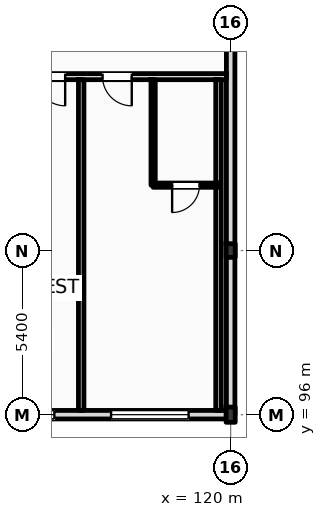
"""IFC4 building model, lengths in metres.
Left out: names, types, materials, properties, quantities, classifications, styles, units other than length and angle.
Written with IfcOpenShell. Run it as: python <this file> out.ifc"""

import sys

from ifc_helpers import new_model, si_unit, direction, frame, frame_2d, origin, origin_2d, place, context, subcontext, project, spatial, rectangle, i_section, extrude, element, fill, save


model = new_model("IFC4")
c1 = context("Model", 3, precision=1e-05, world=origin(), true_north=direction((0.0, 1.0)))
c2 = subcontext(c1, "Body", "Model", "MODEL_VIEW")
j1 = project(units=[si_unit("LENGTHUNIT", "METRE"), si_unit("PLANEANGLEUNIT", "RADIAN")], contexts=[c1])
p1 = place(None, origin())
s1 = spatial("IfcSite", under=j1, at=p1, CompositionType="ELEMENT")
p2 = place(p1, origin())
s2 = spatial("IfcBuilding", under=s1, at=p2, CompositionType="ELEMENT")
p3 = place(p2, frame((0.0, 0.0, 31.8)))
s3 = spatial("IfcBuildingStorey", under=s2, at=p3, CompositionType="ELEMENT", Elevation=31.8)
p4 = place(p3, frame((120.0, 96.0, 0.0), z_axis=(0.0, 0.0, 1.0), x_axis=(1.0, 0.0, 0.0)))
e1 = element("IfcColumn", 1, at=p4, inside=s3, PredefinedType="COLUMN", context=c2, shape_type="SweptSolid", body=[
    extrude(i_section(OverallWidth=0.3, OverallDepth=0.5, WebThickness=0.014, FlangeThickness=0.028, FilletRadius=0.027, at=origin_2d()), origin(), (0.0, 0.0, 1.0), 3.6),
])
p5 = place(p3, frame((120.0, 101.4, 0.0), z_axis=(0.0, 0.0, 1.0), x_axis=(1.0, 0.0, 0.0)))
e2 = element("IfcColumn", 2, at=p5, inside=s3, PredefinedType="COLUMN", context=c2, shape_type="SweptSolid", body=[
    extrude(i_section(OverallWidth=0.3, OverallDepth=0.45, WebThickness=0.014, FlangeThickness=0.026, FilletRadius=0.027, at=origin_2d()), origin(), (0.0, 0.0, 1.0), 3.6),
])
p6 = place(p3, frame((120.0, 96.0, 0.0), z_axis=(0.0, 0.0, 1.0), x_axis=(0.0, 1.0, 0.0)))
e3 = element("IfcWall", 3, at=p6, inside=s3, PredefinedType="STANDARD", context=c2, shape_type="SweptSolid", body=[
    extrude(rectangle(XDim=22.0, YDim=0.28, at=frame_2d((11.0, 0.0))), origin(), (0.0, 0.0, 1.0), 2.91),
])
p7 = place(p3, frame((25.2, 96.0, 0.0), z_axis=(0.0, 0.0, 1.0), x_axis=(1.0, 0.0, 0.0)))
e4 = element("IfcWall", 4, at=p7, inside=s3, PredefinedType="STANDARD", context=c2, shape_type="SweptSolid", body=[
    extrude(rectangle(XDim=94.8, YDim=0.28, at=frame_2d((47.4, 0.0))), origin(), (0.0, 0.0, 1.0), 2.72),
])
p8 = place(p7, frame((16.394, 0.0, 0.9)))
e5 = element("IfcOpeningElement", 5, at=p8, cuts=e4, PredefinedType="OPENING", context=c2, shape_type="SweptSolid", body=[
    extrude(rectangle(XDim=2.0, YDim=1.64, at=frame_2d((1.0, 0.82))), frame((0.0, 0.15, 0.0), z_axis=(0.0, -1.0, 0.0), x_axis=(1.0, 0.0, 0.0)), (0.0, 0.0, 1.0), 0.3),
])
p9 = place(p7, frame((20.207, 0.0, 0.9)))
e6 = element("IfcOpeningElement", 6, at=p9, cuts=e4, PredefinedType="OPENING", context=c2, shape_type="SweptSolid", body=[
    extrude(rectangle(XDim=2.3, YDim=1.64, at=frame_2d((1.15, 0.82))), frame((0.0, 0.15, 0.0), z_axis=(0.0, -1.0, 0.0), x_axis=(1.0, 0.0, 0.0)), (0.0, 0.0, 1.0), 0.3),
])
p10 = place(p7, frame((24.287, 0.0, 0.9)))
e7 = element("IfcOpeningElement", 7, at=p10, cuts=e4, PredefinedType="OPENING", context=c2, shape_type="SweptSolid", body=[
    extrude(rectangle(XDim=2.358, YDim=1.64, at=frame_2d((1.179, 0.82))), frame((0.0, 0.15, 0.0), z_axis=(0.0, -1.0, 0.0), x_axis=(1.0, 0.0, 0.0)), (0.0, 0.0, 1.0), 0.3),
])
p11 = place(p7, frame((27.665, 0.0, 0.9)))
e8 = element("IfcOpeningElement", 8, at=p11, cuts=e4, PredefinedType="OPENING", context=c2, shape_type="SweptSolid", body=[
    extrude(rectangle(XDim=1.8, YDim=1.64, at=frame_2d((0.9, 0.82))), frame((0.0, 0.15, 0.0), z_axis=(0.0, -1.0, 0.0), x_axis=(1.0, 0.0, 0.0)), (0.0, 0.0, 1.0), 0.3),
])
p12 = place(p7, frame((32.103, 0.0, 0.9)))
e9 = element("IfcOpeningElement", 9, at=p12, cuts=e4, PredefinedType="OPENING", context=c2, shape_type="SweptSolid", body=[
    extrude(rectangle(XDim=2.359, YDim=1.64, at=frame_2d((1.179, 0.82))), frame((0.0, 0.15, 0.0), z_axis=(0.0, -1.0, 0.0), x_axis=(1.0, 0.0, 0.0)), (0.0, 0.0, 1.0), 0.3),
])
p13 = place(p7, frame((36.336, 0.0, 0.9)))
e10 = element("IfcOpeningElement", 10, at=p13, cuts=e4, PredefinedType="OPENING", context=c2, shape_type="SweptSolid", body=[
    extrude(rectangle(XDim=1.2, YDim=1.64, at=frame_2d((0.6, 0.82))), frame((0.0, 0.15, 0.0), z_axis=(0.0, -1.0, 0.0), x_axis=(1.0, 0.0, 0.0)), (0.0, 0.0, 1.0), 0.3),
])
p14 = place(p7, frame((56.177, 0.0, 0.9)))
e11 = element("IfcOpeningElement", 11, at=p14, cuts=e4, PredefinedType="OPENING", context=c2, shape_type="SweptSolid", body=[
    extrude(rectangle(XDim=1.35, YDim=1.64, at=frame_2d((0.675, 0.82))), frame((0.0, 0.15, 0.0), z_axis=(0.0, -1.0, 0.0), x_axis=(1.0, 0.0, 0.0)), (0.0, 0.0, 1.0), 0.3),
])
p15 = place(p7, frame((60.086, 0.0, 0.9)))
e12 = element("IfcOpeningElement", 12, at=p15, cuts=e4, PredefinedType="OPENING", context=c2, shape_type="SweptSolid", body=[
    extrude(rectangle(XDim=1.5, YDim=1.64, at=frame_2d((0.75, 0.82))), frame((0.0, 0.15, 0.0), z_axis=(0.0, -1.0, 0.0), x_axis=(1.0, 0.0, 0.0)), (0.0, 0.0, 1.0), 0.3),
])
p16 = place(p7, frame((64.838, 0.0, 0.9)))
e13 = element("IfcOpeningElement", 13, at=p16, cuts=e4, PredefinedType="OPENING", context=c2, shape_type="SweptSolid", body=[
    extrude(rectangle(XDim=1.65, YDim=1.64, at=frame_2d((0.825, 0.82))), frame((0.0, 0.15, 0.0), z_axis=(0.0, -1.0, 0.0), x_axis=(1.0, 0.0, 0.0)), (0.0, 0.0, 1.0), 0.3),
])
p17 = place(p7, frame((68.419, 0.0, 0.9)))
e14 = element("IfcOpeningElement", 14, at=p17, cuts=e4, PredefinedType="OPENING", context=c2, shape_type="SweptSolid", body=[
    extrude(rectangle(XDim=0.9, YDim=1.64, at=frame_2d((0.45, 0.82))), frame((0.0, 0.15, 0.0), z_axis=(0.0, -1.0, 0.0), x_axis=(1.0, 0.0, 0.0)), (0.0, 0.0, 1.0), 0.3),
])
p18 = place(p7, frame((73.544, 0.0, 0.9)))
e15 = element("IfcOpeningElement", 15, at=p18, cuts=e4, PredefinedType="OPENING", context=c2, shape_type="SweptSolid", body=[
    extrude(rectangle(XDim=1.95, YDim=1.64, at=frame_2d((0.975, 0.82))), frame((0.0, 0.15, 0.0), z_axis=(0.0, -1.0, 0.0), x_axis=(1.0, 0.0, 0.0)), (0.0, 0.0, 1.0), 0.3),
])
p19 = place(p7, frame((78.897, 0.0, 0.9)))
e16 = element("IfcOpeningElement", 16, at=p19, cuts=e4, PredefinedType="OPENING", context=c2, shape_type="SweptSolid", body=[
    extrude(rectangle(XDim=1.35, YDim=1.64, at=frame_2d((0.675, 0.82))), frame((0.0, 0.15, 0.0), z_axis=(0.0, -1.0, 0.0), x_axis=(1.0, 0.0, 0.0)), (0.0, 0.0, 1.0), 0.3),
])
p20 = place(p7, frame((82.249, 0.0, 0.9)))
e17 = element("IfcOpeningElement", 17, at=p20, cuts=e4, PredefinedType="OPENING", context=c2, shape_type="SweptSolid", body=[
    extrude(rectangle(XDim=2.25, YDim=1.64, at=frame_2d((1.125, 0.82))), frame((0.0, 0.15, 0.0), z_axis=(0.0, -1.0, 0.0), x_axis=(1.0, 0.0, 0.0)), (0.0, 0.0, 1.0), 0.3),
])
p21 = place(p7, frame((87.202, 0.0, 0.9)))
e18 = element("IfcOpeningElement", 18, at=p21, cuts=e4, PredefinedType="OPENING", context=c2, shape_type="SweptSolid", body=[
    extrude(rectangle(XDim=1.8, YDim=1.64, at=frame_2d((0.9, 0.82))), frame((0.0, 0.15, 0.0), z_axis=(0.0, -1.0, 0.0), x_axis=(1.0, 0.0, 0.0)), (0.0, 0.0, 1.0), 0.3),
])
p22 = place(p7, frame((90.867, 0.0, 0.9)))
e19 = element("IfcOpeningElement", 19, at=p22, cuts=e4, PredefinedType="OPENING", context=c2, shape_type="SweptSolid", body=[
    extrude(rectangle(XDim=2.55, YDim=1.64, at=frame_2d((1.275, 0.82))), frame((0.0, 0.15, 0.0), z_axis=(0.0, -1.0, 0.0), x_axis=(1.0, 0.0, 0.0)), (0.0, 0.0, 1.0), 0.3),
])
p23 = place(p3, frame((79.76, 107.12, 0.0), z_axis=(0.0, 0.0, 1.0), x_axis=(1.0, 0.0, 0.0)))
e20 = element("IfcWall", 20, at=p23, inside=s3, PredefinedType="PARTITIONING", context=c2, shape_type="SweptSolid", body=[
    extrude(rectangle(XDim=40.1, YDim=0.2, at=frame_2d((20.05, 0.0))), origin(), (0.0, 0.0, 1.0), 3.36),
])
p24 = place(p23, frame((2.887, 0.0, 0.0)))
e21 = element("IfcOpeningElement", 21, at=p24, cuts=e20, PredefinedType="OPENING", context=c2, shape_type="SweptSolid", body=[
    extrude(rectangle(XDim=0.96, YDim=2.2, at=frame_2d((0.48, 1.1))), frame((0.0, 0.11, 0.0), z_axis=(0.0, -1.0, 0.0), x_axis=(1.0, 0.0, 0.0)), (0.0, 0.0, 1.0), 0.22),
])
p25 = place(p23, frame((5.121, 0.0, 0.0)))
e22 = element("IfcOpeningElement", 22, at=p25, cuts=e20, PredefinedType="OPENING", context=c2, shape_type="SweptSolid", body=[
    extrude(rectangle(XDim=0.96, YDim=2.2, at=frame_2d((0.48, 1.1))), frame((0.0, 0.11, 0.0), z_axis=(0.0, -1.0, 0.0), x_axis=(1.0, 0.0, 0.0)), (0.0, 0.0, 1.0), 0.22),
])
p26 = place(p23, frame((11.698, 0.0, 0.0)))
e23 = element("IfcOpeningElement", 23, at=p26, cuts=e20, PredefinedType="OPENING", context=c2, shape_type="SweptSolid", body=[
    extrude(rectangle(XDim=0.96, YDim=2.2, at=frame_2d((0.48, 1.1))), frame((0.0, 0.11, 0.0), z_axis=(0.0, -1.0, 0.0), x_axis=(1.0, 0.0, 0.0)), (0.0, 0.0, 1.0), 0.22),
])
p27 = place(p23, frame((13.976, 0.0, 0.0)))
e24 = element("IfcOpeningElement", 24, at=p27, cuts=e20, PredefinedType="OPENING", context=c2, shape_type="SweptSolid", body=[
    extrude(rectangle(XDim=0.96, YDim=2.2, at=frame_2d((0.48, 1.1))), frame((0.0, 0.11, 0.0), z_axis=(0.0, -1.0, 0.0), x_axis=(1.0, 0.0, 0.0)), (0.0, 0.0, 1.0), 0.22),
])
p28 = place(p23, frame((20.554, 0.0, 0.0)))
e25 = element("IfcOpeningElement", 25, at=p28, cuts=e20, PredefinedType="OPENING", context=c2, shape_type="SweptSolid", body=[
    extrude(rectangle(XDim=0.96, YDim=2.2, at=frame_2d((0.48, 1.1))), frame((0.0, 0.11, 0.0), z_axis=(0.0, -1.0, 0.0), x_axis=(1.0, 0.0, 0.0)), (0.0, 0.0, 1.0), 0.22),
])
p29 = place(p23, frame((24.982, 0.0, 0.0)))
e26 = element("IfcOpeningElement", 26, at=p29, cuts=e20, PredefinedType="OPENING", context=c2, shape_type="SweptSolid", body=[
    extrude(rectangle(XDim=0.96, YDim=2.2, at=frame_2d((0.48, 1.1))), frame((0.0, 0.11, 0.0), z_axis=(0.0, -1.0, 0.0), x_axis=(1.0, 0.0, 0.0)), (0.0, 0.0, 1.0), 0.22),
])
p30 = place(p23, frame((29.409, 0.0, 0.0)))
e27 = element("IfcOpeningElement", 27, at=p30, cuts=e20, PredefinedType="OPENING", context=c2, shape_type="SweptSolid", body=[
    extrude(rectangle(XDim=0.96, YDim=2.2, at=frame_2d((0.48, 1.1))), frame((0.0, 0.11, 0.0), z_axis=(0.0, -1.0, 0.0), x_axis=(1.0, 0.0, 0.0)), (0.0, 0.0, 1.0), 0.22),
])
p31 = place(p23, frame((33.837, 0.0, 0.0)))
e28 = element("IfcOpeningElement", 28, at=p31, cuts=e20, PredefinedType="OPENING", context=c2, shape_type="SweptSolid", body=[
    extrude(rectangle(XDim=0.96, YDim=2.2, at=frame_2d((0.48, 1.1))), frame((0.0, 0.11, 0.0), z_axis=(0.0, -1.0, 0.0), x_axis=(1.0, 0.0, 0.0)), (0.0, 0.0, 1.0), 0.22),
])
p32 = place(p23, frame((36.027, 0.0, 0.0)))
e29 = element("IfcOpeningElement", 29, at=p32, cuts=e20, PredefinedType="OPENING", context=c2, shape_type="SweptSolid", body=[
    extrude(rectangle(XDim=0.96, YDim=2.2, at=frame_2d((0.48, 1.1))), frame((0.0, 0.11, 0.0), z_axis=(0.0, -1.0, 0.0), x_axis=(1.0, 0.0, 0.0)), (0.0, 0.0, 1.0), 0.22),
])
for number, where, z_axis, x_axis in (
    (30, (115.084, 96.14, 0.0), (0.0, 0.0, 1.0), (0.0, 1.0, 0.0)),
    (31, (119.6, 96.14, 0.0), (0.0, 0.0, 1.0), (0.0, 1.0, 0.0)),
):
    element("IfcWall", number, at=place(p3, frame(where, z_axis=z_axis, x_axis=x_axis)), inside=s3, PredefinedType="PARTITIONING", context=c2, shape_type="SweptSolid", body=[
        extrude(rectangle(XDim=10.88, YDim=0.18, at=frame_2d((5.44, 0.0))), origin(), (0.0, 0.0, 1.0), 3.36),
    ])
p33 = place(p3, frame((117.45, 103.55, 0.0), z_axis=(0.0, 0.0, 1.0), x_axis=(0.0, 1.0, 0.0)))
e32 = element("IfcWall", 32, at=p33, inside=s3, PredefinedType="PARTITIONING", context=c2, shape_type="SweptSolid", body=[
    extrude(rectangle(XDim=3.47, YDim=0.14, at=frame_2d((1.735, 0.0))), origin(), (0.0, 0.0, 1.0), 3.36),
])
p34 = place(p3, frame((117.45, 103.55, 0.0), z_axis=(0.0, 0.0, 1.0), x_axis=(1.0, 0.0, 0.0)))
e33 = element("IfcWall", 33, at=p34, inside=s3, PredefinedType="PARTITIONING", context=c2, shape_type="SweptSolid", body=[
    extrude(rectangle(XDim=2.15, YDim=0.14, at=frame_2d((1.075, 0.0))), origin(), (0.0, 0.0, 1.0), 3.36),
])
p35 = place(p34, frame((0.625, 0.0, 0.0)))
e34 = element("IfcOpeningElement", 34, at=p35, cuts=e33, PredefinedType="OPENING", context=c2, shape_type="SweptSolid", body=[
    extrude(rectangle(XDim=0.9, YDim=2.1, at=frame_2d((0.45, 1.05))), frame((0.0, 0.08, 0.0), z_axis=(0.0, -1.0, 0.0), x_axis=(1.0, 0.0, 0.0)), (0.0, 0.0, 1.0), 0.16),
])
p36 = place(p21, origin())
e35 = element("IfcWindow", 35, at=p36, inside=s3, PartitioningType="DOUBLE_PANEL_VERTICAL", PredefinedType="WINDOW", context=c2, shape_type="SweptSolid", body=[
    extrude(rectangle(XDim=1.8, YDim=1.64, at=frame_2d((0.9, 0.82))), frame((0.0, 0.03, 0.0), z_axis=(0.0, -1.0, 0.0), x_axis=(1.0, 0.0, 0.0)), (0.0, 0.0, 1.0), 0.06),
])
fill(e18, e35)
p37 = place(p22, origin())
e36 = element("IfcWindow", 36, at=p37, inside=s3, PartitioningType="DOUBLE_PANEL_VERTICAL", PredefinedType="WINDOW", context=c2, shape_type="SweptSolid", body=[
    extrude(rectangle(XDim=2.55, YDim=1.64, at=frame_2d((1.275, 0.82))), frame((0.0, 0.03, 0.0), z_axis=(0.0, -1.0, 0.0), x_axis=(1.0, 0.0, 0.0)), (0.0, 0.0, 1.0), 0.06),
])
fill(e19, e36)
p38 = place(p31, frame((0.96, 0.0, 0.0), z_axis=(0.0, 0.0, 1.0), x_axis=(-1.0, 0.0, 0.0)))
e37 = element("IfcDoor", 37, at=p38, inside=s3, OperationType="SINGLE_SWING_RIGHT", PredefinedType="DOOR", context=c2, shape_type="SweptSolid", body=[
    extrude(rectangle(XDim=0.96, YDim=2.2, at=frame_2d((0.48, 1.1))), frame((0.0, 0.025, 0.0), z_axis=(0.0, -1.0, 0.0), x_axis=(1.0, 0.0, 0.0)), (0.0, 0.0, 1.0), 0.05),
])
fill(e28, e37)
p39 = place(p32, frame((0.96, 0.0, 0.0), z_axis=(0.0, 0.0, 1.0), x_axis=(-1.0, 0.0, 0.0)))
e38 = element("IfcDoor", 38, at=p39, inside=s3, OperationType="SINGLE_SWING_RIGHT", PredefinedType="DOOR", context=c2, shape_type="SweptSolid", body=[
    extrude(rectangle(XDim=0.96, YDim=2.2, at=frame_2d((0.48, 1.1))), frame((0.0, 0.025, 0.0), z_axis=(0.0, -1.0, 0.0), x_axis=(1.0, 0.0, 0.0)), (0.0, 0.0, 1.0), 0.05),
])
fill(e29, e38)
p40 = place(p35, frame((0.9, 0.0, 0.0), z_axis=(0.0, 0.0, 1.0), x_axis=(-1.0, 0.0, 0.0)))
e39 = element("IfcDoor", 39, at=p40, inside=s3, OperationType="SINGLE_SWING_LEFT", PredefinedType="DOOR", context=c2, shape_type="SweptSolid", body=[
    extrude(rectangle(XDim=0.9, YDim=2.1, at=frame_2d((0.45, 1.05))), frame((0.0, 0.025, 0.0), z_axis=(0.0, -1.0, 0.0), x_axis=(1.0, 0.0, 0.0)), (0.0, 0.0, 1.0), 0.05),
])
fill(e34, e39)
save(model, sys.argv[1])
